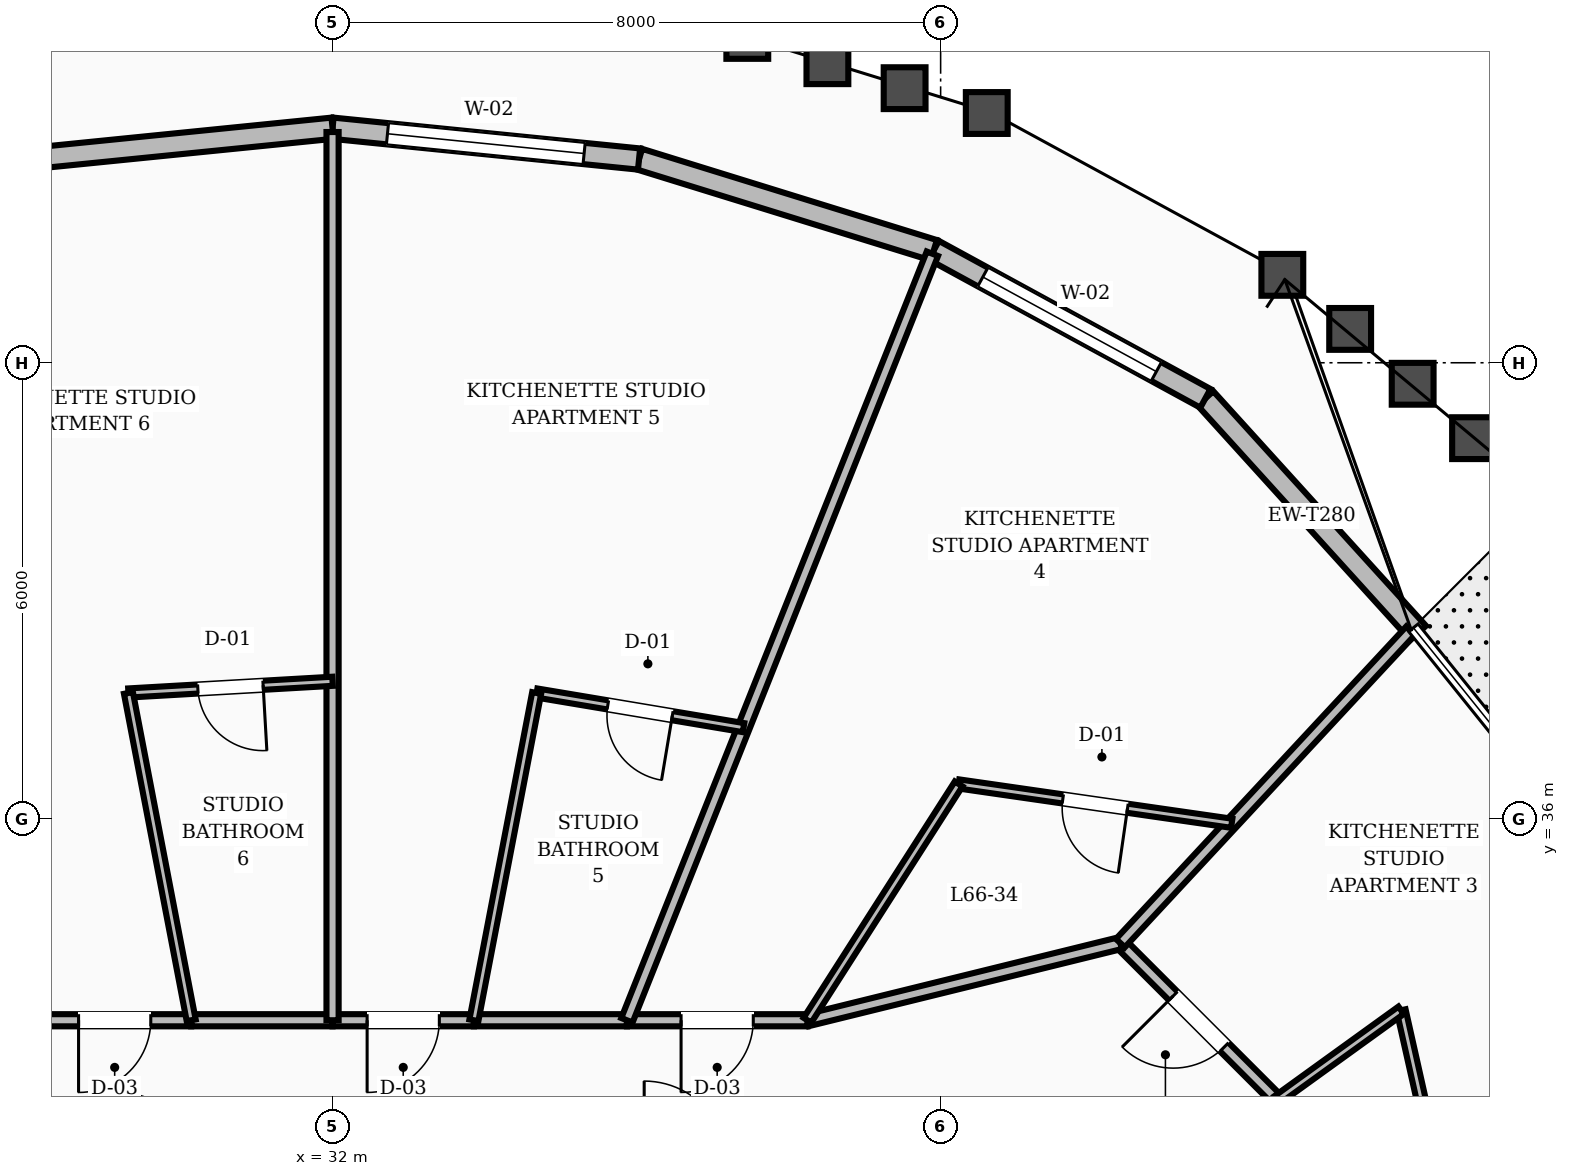
"""IFC4 building model, lengths in metres.
Left out: names, types, materials, properties, quantities, classifications, styles, units other than length and angle.
Written with IfcOpenShell. Run it as: python <this file> out.ifc"""

import sys

from ifc_helpers import new_model, si_unit, direction, frame, frame_2d, origin, place, context, subcontext, project, spatial, rectangle, extrude, element, fill, save


model = new_model("IFC4")
c1 = context("Model", 3, precision=1e-05, world=origin(), true_north=direction((0.0, 1.0)))
c2 = subcontext(c1, "Body", "Model", "MODEL_VIEW")
j1 = project(units=[si_unit("LENGTHUNIT", "METRE"), si_unit("PLANEANGLEUNIT", "RADIAN")], contexts=[c1])
p1 = place(None, origin())
s1 = spatial("IfcSite", under=j1, at=p1, CompositionType="ELEMENT")
p2 = place(p1, origin())
s2 = spatial("IfcBuilding", under=s1, at=p2, CompositionType="ELEMENT")
p3 = place(p2, frame((0.0, 0.0, 254.4)))
s3 = spatial("IfcBuildingStorey", under=s2, at=p3, CompositionType="ELEMENT", Elevation=254.4)
p4 = place(p3, frame((46.281, 38.446, 0.0), z_axis=(0.0, 0.0, 1.0), x_axis=(-0.67165415444, 0.740864830332, 0.0)))
e1 = element("IfcWall", 1, at=p4, inside=s3, PredefinedType="STANDARD", context=c2, shape_type="SweptSolid", body=[
    extrude(rectangle(XDim=4.166, YDim=0.28, at=frame_2d((2.083, 0.0))), origin(), (0.0, 0.0, 1.0), 2.88),
])
p5 = place(p3, frame((43.483, 41.532, 0.0), z_axis=(0.0, 0.0, 1.0), x_axis=(-0.877966625542, 0.478721844534, 0.0)))
e2 = element("IfcWall", 2, at=p5, inside=s3, PredefinedType="STANDARD", context=c2, shape_type="SweptSolid", body=[
    extrude(rectangle(XDim=4.07, YDim=0.28, at=frame_2d((2.035, 0.0))), origin(), (0.0, 0.0, 1.0), 2.88),
])
p6 = place(p5, frame((0.735, 0.0, 0.8)))
e3 = element("IfcOpeningElement", 3, at=p6, cuts=e2, PredefinedType="OPENING", context=c2, shape_type="SweptSolid", body=[
    extrude(rectangle(XDim=2.6, YDim=1.65, at=frame_2d((1.3, 0.825))), frame((0.0, 0.15, 0.0), z_axis=(0.0, -1.0, 0.0), x_axis=(1.0, 0.0, 0.0)), (0.0, 0.0, 1.0), 0.3),
])
p7 = place(p3, frame((39.91, 43.48, 0.0), z_axis=(0.0, 0.0, 1.0), x_axis=(-0.955300452464, 0.295636678243, 0.0)))
e4 = element("IfcWall", 4, at=p7, inside=s3, PredefinedType="STANDARD", context=c2, shape_type="SweptSolid", body=[
    extrude(rectangle(XDim=4.059, YDim=0.28, at=frame_2d((2.029, 0.0))), origin(), (0.0, 0.0, 1.0), 2.88),
])
p8 = place(p3, frame((36.032, 44.68, 0.0), z_axis=(0.0, 0.0, 1.0), x_axis=(-0.994993554733, 0.099939111661, 0.0)))
e5 = element("IfcWall", 5, at=p8, inside=s3, PredefinedType="STANDARD", context=c2, shape_type="SweptSolid", body=[
    extrude(rectangle(XDim=4.053, YDim=0.28, at=frame_2d((2.026, 0.0))), origin(), (0.0, 0.0, 1.0), 2.88),
])
p9 = place(p8, frame((0.726, 0.0, 0.8)))
e6 = element("IfcOpeningElement", 6, at=p9, cuts=e5, PredefinedType="OPENING", context=c2, shape_type="SweptSolid", body=[
    extrude(rectangle(XDim=2.6, YDim=1.65, at=frame_2d((1.3, 0.825))), frame((0.0, 0.15, 0.0), z_axis=(0.0, -1.0, 0.0), x_axis=(1.0, 0.0, 0.0)), (0.0, 0.0, 1.0), 0.3),
])
p10 = place(p3, frame((32.0, 45.085, 0.0), z_axis=(0.0, 0.0, 1.0), x_axis=(-0.994993554733, -0.099939111661, 0.0)))
e7 = element("IfcWall", 7, at=p10, inside=s3, PredefinedType="STANDARD", context=c2, shape_type="SweptSolid", body=[
    extrude(rectangle(XDim=4.053, YDim=0.28, at=frame_2d((2.026, 0.0))), origin(), (0.0, 0.0, 1.0), 2.88),
])
p11 = place(p3, frame((44.427, 32.303, 0.0), z_axis=(0.0, 0.0, 1.0), x_axis=(-0.707106781187, 0.707106781187, 0.0)))
e8 = element("IfcWall", 8, at=p11, inside=s3, PredefinedType="SOLIDWALL", context=c2, shape_type="SweptSolid", body=[
    extrude(rectangle(XDim=2.916, YDim=0.16, at=frame_2d((1.458, 0.0))), origin(), (0.0, 0.0, 1.0), 2.87),
])
p12 = place(p11, frame((0.983, 0.0, 0.0)))
e9 = element("IfcOpeningElement", 9, at=p12, cuts=e8, PredefinedType="OPENING", context=c2, shape_type="SweptSolid", body=[
    extrude(rectangle(XDim=0.95, YDim=2.1, at=frame_2d((0.475, 1.05))), frame((0.0, 0.09, 0.0), z_axis=(0.0, -1.0, 0.0), x_axis=(1.0, 0.0, 0.0)), (0.0, 0.0, 1.0), 0.18),
])
p13 = place(p3, frame((42.365, 34.365, 0.0), z_axis=(0.0, 0.0, 1.0), x_axis=(-0.970939799552, -0.239323850978, 0.0)))
e10 = element("IfcWall", 10, at=p13, inside=s3, PredefinedType="SOLIDWALL", context=c2, shape_type="SweptSolid", body=[
    extrude(rectangle(XDim=4.241, YDim=0.16, at=frame_2d((2.12, 0.0))), origin(), (0.0, 0.0, 1.0), 2.87),
])
p14 = place(p3, frame((38.248, 33.35, 0.0), z_axis=(0.0, 0.0, 1.0), x_axis=(-1.0, 0.0, 0.0)))
e11 = element("IfcWall", 11, at=p14, inside=s3, PredefinedType="SOLIDWALL", context=c2, shape_type="SweptSolid", body=[
    extrude(rectangle(XDim=2.375, YDim=0.16, at=frame_2d((1.188, 0.0))), origin(), (0.0, 0.0, 1.0), 2.87),
])
p15 = place(p14, frame((0.712, 0.0, 0.0)))
e12 = element("IfcOpeningElement", 12, at=p15, cuts=e11, PredefinedType="OPENING", context=c2, shape_type="SweptSolid", body=[
    extrude(rectangle(XDim=0.95, YDim=2.1, at=frame_2d((0.475, 1.05))), frame((0.0, 0.09, 0.0), z_axis=(0.0, -1.0, 0.0), x_axis=(1.0, 0.0, 0.0)), (0.0, 0.0, 1.0), 0.18),
])
p16 = place(p3, frame((35.873, 33.35, 0.0), z_axis=(0.0, 0.0, 1.0), x_axis=(-1.0, 0.0, 0.0)))
e13 = element("IfcWall", 13, at=p16, inside=s3, PredefinedType="SOLIDWALL", context=c2, shape_type="SweptSolid", body=[
    extrude(rectangle(XDim=2.013, YDim=0.16, at=frame_2d((1.006, 0.0))), origin(), (0.0, 0.0, 1.0), 2.87),
])
p17 = place(p3, frame((33.86, 33.35, 0.0), z_axis=(0.0, 0.0, 1.0), x_axis=(-1.0, 0.0, 0.0)))
e14 = element("IfcWall", 14, at=p17, inside=s3, PredefinedType="SOLIDWALL", context=c2, shape_type="SweptSolid", body=[
    extrude(rectangle(XDim=1.86, YDim=0.16, at=frame_2d((0.93, 0.0))), origin(), (0.0, 0.0, 1.0), 2.87),
])
p18 = place(p17, frame((0.455, 0.0, 0.0)))
e15 = element("IfcOpeningElement", 15, at=p18, cuts=e14, PredefinedType="OPENING", context=c2, shape_type="SweptSolid", body=[
    extrude(rectangle(XDim=0.95, YDim=2.1, at=frame_2d((0.475, 1.05))), frame((0.0, 0.09, 0.0), z_axis=(0.0, -1.0, 0.0), x_axis=(1.0, 0.0, 0.0)), (0.0, 0.0, 1.0), 0.18),
])
p19 = place(p3, frame((32.0, 33.35, 0.0), z_axis=(0.0, 0.0, 1.0), x_axis=(-1.0, 0.0, 0.0)))
e16 = element("IfcWall", 16, at=p19, inside=s3, PredefinedType="SOLIDWALL", context=c2, shape_type="SweptSolid", body=[
    extrude(rectangle(XDim=1.86, YDim=0.16, at=frame_2d((0.93, 0.0))), origin(), (0.0, 0.0, 1.0), 2.87),
])
p20 = place(p3, frame((30.14, 33.35, 0.0), z_axis=(0.0, 0.0, 1.0), x_axis=(-1.0, 0.0, 0.0)))
e17 = element("IfcWall", 17, at=p20, inside=s3, PredefinedType="SOLIDWALL", context=c2, shape_type="SweptSolid", body=[
    extrude(rectangle(XDim=2.013, YDim=0.16, at=frame_2d((1.006, 0.0))), origin(), (0.0, 0.0, 1.0), 2.87),
])
p21 = place(p20, frame((0.531, 0.0, 0.0)))
e18 = element("IfcOpeningElement", 18, at=p21, cuts=e17, PredefinedType="OPENING", context=c2, shape_type="SweptSolid", body=[
    extrude(rectangle(XDim=0.95, YDim=2.1, at=frame_2d((0.475, 1.05))), frame((0.0, 0.09, 0.0), z_axis=(0.0, -1.0, 0.0), x_axis=(1.0, 0.0, 0.0)), (0.0, 0.0, 1.0), 0.18),
])
p22 = place(p3, frame((46.798, 30.19, 0.0), z_axis=(0.0, 0.0, 1.0), x_axis=(-0.219152241428, 0.97569067592, 0.0)))
e19 = element("IfcWall", 19, at=p22, inside=s3, PredefinedType="PARTITIONING", context=c2, shape_type="SweptSolid", body=[
    extrude(rectangle(XDim=3.373, YDim=0.12, at=frame_2d((1.687, 0.0))), origin(), (0.0, 0.0, 1.0), 2.87),
])
p23 = place(p22, frame((1.257, 0.0, 0.0)))
e20 = element("IfcOpeningElement", 20, at=p23, cuts=e19, PredefinedType="OPENING", context=c2, shape_type="SweptSolid", body=[
    extrude(rectangle(XDim=0.86, YDim=2.1, at=frame_2d((0.43, 1.05))), frame((0.0, 0.07, 0.0), z_axis=(0.0, -1.0, 0.0), x_axis=(1.0, 0.0, 0.0)), (0.0, 0.0, 1.0), 0.14),
])
p24 = place(p3, frame((44.427, 32.303, 0.0), z_axis=(0.0, 0.0, 1.0), x_axis=(0.810771991246, 0.58536209154, 0.0)))
e21 = element("IfcWall", 21, at=p24, inside=s3, PredefinedType="PARTITIONING", context=c2, shape_type="SweptSolid", body=[
    extrude(rectangle(XDim=2.012, YDim=0.12, at=frame_2d((1.006, 0.0))), origin(), (0.0, 0.0, 1.0), 2.87),
])
p25 = place(p3, frame((42.365, 34.365, 0.0), z_axis=(0.0, 0.0, 1.0), x_axis=(0.680662948216, 0.732596717797, 0.0)))
e22 = element("IfcWall", 22, at=p25, inside=s3, PredefinedType="SOLIDWALL", context=c2, shape_type="SweptSolid", body=[
    extrude(rectangle(XDim=5.613, YDim=0.16, at=frame_2d((2.807, 0.0))), origin(), (0.0, 0.0, 1.0), 2.87),
])
p26 = place(p3, frame((43.83, 35.941, 0.0), z_axis=(0.0, 0.0, 1.0), x_axis=(-0.989771139655, 0.142664260089, 0.0)))
e23 = element("IfcWall", 23, at=p26, inside=s3, PredefinedType="PARTITIONING", context=c2, shape_type="SweptSolid", body=[
    extrude(rectangle(XDim=3.63, YDim=0.12, at=frame_2d((1.815, 0.0))), origin(), (0.0, 0.0, 1.0), 2.87),
])
p27 = place(p26, frame((1.385, 0.0, 0.0)))
e24 = element("IfcOpeningElement", 24, at=p27, cuts=e23, PredefinedType="OPENING", context=c2, shape_type="SweptSolid", body=[
    extrude(rectangle(XDim=0.86, YDim=2.1, at=frame_2d((0.43, 1.05))), frame((0.0, 0.07, 0.0), z_axis=(0.0, -1.0, 0.0), x_axis=(1.0, 0.0, 0.0)), (0.0, 0.0, 1.0), 0.14),
])
p28 = place(p3, frame((38.248, 33.35, 0.0), z_axis=(0.0, 0.0, 1.0), x_axis=(0.538988003625, 0.842313440442, 0.0)))
e25 = element("IfcWall", 25, at=p28, inside=s3, PredefinedType="PARTITIONING", context=c2, shape_type="SweptSolid", body=[
    extrude(rectangle(XDim=3.691, YDim=0.12, at=frame_2d((1.846, 0.0))), origin(), (0.0, 0.0, 1.0), 2.87),
])
p29 = place(p3, frame((35.873, 33.35, 0.0), z_axis=(0.0, 0.0, 1.0), x_axis=(0.370196038219, 0.92895365508, 0.0)))
e26 = element("IfcWall", 26, at=p29, inside=s3, PredefinedType="SOLIDWALL", context=c2, shape_type="SweptSolid", body=[
    extrude(rectangle(XDim=10.855, YDim=0.16, at=frame_2d((5.428, 0.0))), origin(), (0.0, 0.0, 1.0), 2.87),
])
p30 = place(p3, frame((37.407, 37.2, 0.0), z_axis=(0.0, 0.0, 1.0), x_axis=(-0.986264501103, 0.16517364761, 0.0)))
e27 = element("IfcWall", 27, at=p30, inside=s3, PredefinedType="PARTITIONING", context=c2, shape_type="SweptSolid", body=[
    extrude(rectangle(XDim=2.76, YDim=0.12, at=frame_2d((1.38, 0.0))), origin(), (0.0, 0.0, 1.0), 2.87),
])
p31 = place(p30, frame((0.95, 0.0, 0.0)))
e28 = element("IfcOpeningElement", 28, at=p31, cuts=e27, PredefinedType="OPENING", context=c2, shape_type="SweptSolid", body=[
    extrude(rectangle(XDim=0.86, YDim=2.1, at=frame_2d((0.43, 1.05))), frame((0.0, 0.07, 0.0), z_axis=(0.0, -1.0, 0.0), x_axis=(1.0, 0.0, 0.0)), (0.0, 0.0, 1.0), 0.14),
])
p32 = place(p3, frame((33.86, 33.35, 0.0), z_axis=(0.0, 0.0, 1.0), x_axis=(0.188291723207, 0.982113143671, 0.0)))
e29 = element("IfcWall", 29, at=p32, inside=s3, PredefinedType="PARTITIONING", context=c2, shape_type="SweptSolid", body=[
    extrude(rectangle(XDim=4.384, YDim=0.12, at=frame_2d((2.192, 0.0))), origin(), (0.0, 0.0, 1.0), 2.87),
])
p33 = place(p3, frame((32.0, 33.35, 0.0), z_axis=(0.0, 0.0, 1.0), x_axis=(0.0, 1.0, 0.0)))
e30 = element("IfcWall", 30, at=p33, inside=s3, PredefinedType="SOLIDWALL", context=c2, shape_type="SweptSolid", body=[
    extrude(rectangle(XDim=11.685, YDim=0.16, at=frame_2d((5.843, 0.0))), origin(), (0.0, 0.0, 1.0), 2.87),
])
p34 = place(p3, frame((32.0, 37.81, 0.0), z_axis=(0.0, 0.0, 1.0), x_axis=(-0.99835845828, -0.05727467835, 0.0)))
e31 = element("IfcWall", 31, at=p34, inside=s3, PredefinedType="PARTITIONING", context=c2, shape_type="SweptSolid", body=[
    extrude(rectangle(XDim=2.69, YDim=0.12, at=frame_2d((1.345, 0.0))), origin(), (0.0, 0.0, 1.0), 2.87),
])
p35 = place(p34, frame((0.915, 0.0, 0.0)))
e32 = element("IfcOpeningElement", 32, at=p35, cuts=e31, PredefinedType="OPENING", context=c2, shape_type="SweptSolid", body=[
    extrude(rectangle(XDim=0.86, YDim=2.1, at=frame_2d((0.43, 1.05))), frame((0.0, 0.07, 0.0), z_axis=(0.0, -1.0, 0.0), x_axis=(1.0, 0.0, 0.0)), (0.0, 0.0, 1.0), 0.14),
])
p36 = place(p3, frame((30.14, 33.35, 0.0), z_axis=(0.0, 0.0, 1.0), x_axis=(-0.188291723207, 0.982113143671, 0.0)))
e33 = element("IfcWall", 33, at=p36, inside=s3, PredefinedType="PARTITIONING", context=c2, shape_type="SweptSolid", body=[
    extrude(rectangle(XDim=4.384, YDim=0.12, at=frame_2d((2.192, 0.0))), origin(), (0.0, 0.0, 1.0), 2.87),
])
p37 = place(p6, origin())
e34 = element("IfcWindow", 34, at=p37, inside=s3, PartitioningType="SINGLE_PANEL", PredefinedType="WINDOW", context=c2, shape_type="SweptSolid", body=[
    extrude(rectangle(XDim=2.6, YDim=1.65, at=frame_2d((1.3, 0.825))), frame((0.0, 0.03, 0.0), z_axis=(0.0, -1.0, 0.0), x_axis=(1.0, 0.0, 0.0)), (0.0, 0.0, 1.0), 0.06),
])
fill(e3, e34)
p38 = place(p9, origin())
e35 = element("IfcWindow", 35, at=p38, inside=s3, PartitioningType="SINGLE_PANEL", PredefinedType="WINDOW", context=c2, shape_type="SweptSolid", body=[
    extrude(rectangle(XDim=2.6, YDim=1.65, at=frame_2d((1.3, 0.825))), frame((0.0, 0.03, 0.0), z_axis=(0.0, -1.0, 0.0), x_axis=(1.0, 0.0, 0.0)), (0.0, 0.0, 1.0), 0.06),
])
fill(e6, e35)
p39 = place(p12, origin())
e36 = element("IfcDoor", 36, at=p39, inside=s3, OperationType="SINGLE_SWING_RIGHT", PredefinedType="DOOR", context=c2, shape_type="SweptSolid", body=[
    extrude(rectangle(XDim=0.95, YDim=2.1, at=frame_2d((0.475, 1.05))), frame((0.0, 0.025, 0.0), z_axis=(0.0, -1.0, 0.0), x_axis=(1.0, 0.0, 0.0)), (0.0, 0.0, 1.0), 0.05),
])
fill(e9, e36)
p40 = place(p27, origin())
e37 = element("IfcDoor", 37, at=p40, inside=s3, OperationType="SINGLE_SWING_LEFT", PredefinedType="DOOR", context=c2, shape_type="SweptSolid", body=[
    extrude(rectangle(XDim=0.86, YDim=2.1, at=frame_2d((0.43, 1.05))), frame((0.0, 0.025, 0.0), z_axis=(0.0, -1.0, 0.0), x_axis=(1.0, 0.0, 0.0)), (0.0, 0.0, 1.0), 0.05),
])
fill(e24, e37)
p41 = place(p15, origin())
e38 = element("IfcDoor", 38, at=p41, inside=s3, OperationType="SINGLE_SWING_RIGHT", PredefinedType="DOOR", context=c2, shape_type="SweptSolid", body=[
    extrude(rectangle(XDim=0.95, YDim=2.1, at=frame_2d((0.475, 1.05))), frame((0.0, 0.025, 0.0), z_axis=(0.0, -1.0, 0.0), x_axis=(1.0, 0.0, 0.0)), (0.0, 0.0, 1.0), 0.05),
])
fill(e12, e38)
p42 = place(p31, origin())
e39 = element("IfcDoor", 39, at=p42, inside=s3, OperationType="SINGLE_SWING_LEFT", PredefinedType="DOOR", context=c2, shape_type="SweptSolid", body=[
    extrude(rectangle(XDim=0.86, YDim=2.1, at=frame_2d((0.43, 1.05))), frame((0.0, 0.025, 0.0), z_axis=(0.0, -1.0, 0.0), x_axis=(1.0, 0.0, 0.0)), (0.0, 0.0, 1.0), 0.05),
])
fill(e28, e39)
p43 = place(p18, origin())
e40 = element("IfcDoor", 40, at=p43, inside=s3, OperationType="SINGLE_SWING_RIGHT", PredefinedType="DOOR", context=c2, shape_type="SweptSolid", body=[
    extrude(rectangle(XDim=0.95, YDim=2.1, at=frame_2d((0.475, 1.05))), frame((0.0, 0.025, 0.0), z_axis=(0.0, -1.0, 0.0), x_axis=(1.0, 0.0, 0.0)), (0.0, 0.0, 1.0), 0.05),
])
fill(e15, e40)
p44 = place(p35, origin())
e41 = element("IfcDoor", 41, at=p44, inside=s3, OperationType="SINGLE_SWING_LEFT", PredefinedType="DOOR", context=c2, shape_type="SweptSolid", body=[
    extrude(rectangle(XDim=0.86, YDim=2.1, at=frame_2d((0.43, 1.05))), frame((0.0, 0.025, 0.0), z_axis=(0.0, -1.0, 0.0), x_axis=(1.0, 0.0, 0.0)), (0.0, 0.0, 1.0), 0.05),
])
fill(e32, e41)
p45 = place(p21, origin())
e42 = element("IfcDoor", 42, at=p45, inside=s3, OperationType="SINGLE_SWING_RIGHT", PredefinedType="DOOR", context=c2, shape_type="SweptSolid", body=[
    extrude(rectangle(XDim=0.95, YDim=2.1, at=frame_2d((0.475, 1.05))), frame((0.0, 0.025, 0.0), z_axis=(0.0, -1.0, 0.0), x_axis=(1.0, 0.0, 0.0)), (0.0, 0.0, 1.0), 0.05),
])
fill(e18, e42)
save(model, sys.argv[1])
